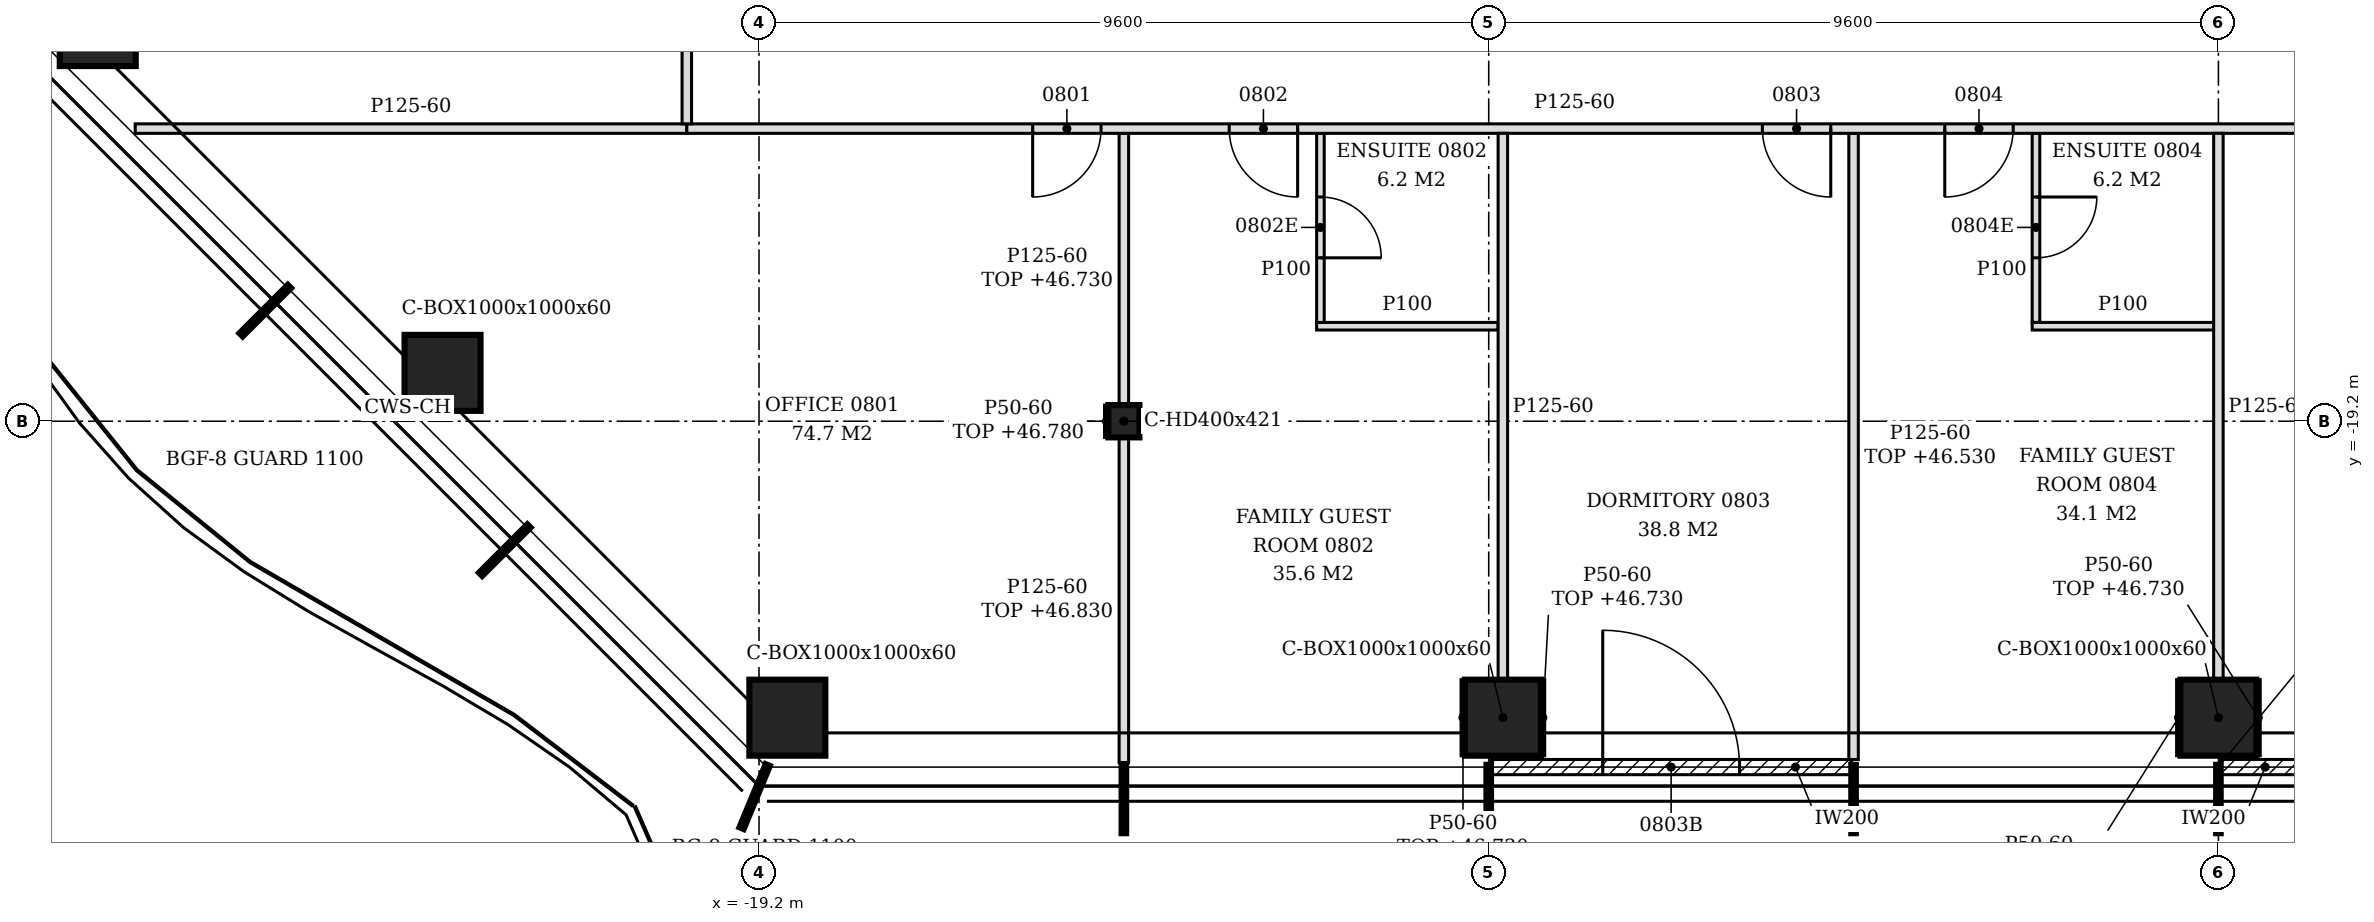
"""IFC4 building model, lengths in metres.
Left out: names, types, materials, properties, quantities, classifications, styles, units other than length and angle.
Written with IfcOpenShell. Run it as: python <this file> out.ifc"""

import sys

from ifc_helpers import new_model, si_unit, direction, frame, frame_2d, origin, origin_2d, place, context, subcontext, project, spatial, polyline, rectangle, hollow_rectangle, i_section, outline, extrude, element, fill, save


model = new_model("IFC4")
c1 = context("Model", 3, precision=1e-05, world=origin(), true_north=direction((0.0, 1.0)))
c2 = subcontext(c1, "Body", "Model", "MODEL_VIEW")
j1 = project(units=[si_unit("LENGTHUNIT", "METRE"), si_unit("PLANEANGLEUNIT", "RADIAN")], contexts=[c1])
p1 = place(None, origin())
s1 = spatial("IfcSite", under=j1, at=p1, CompositionType="ELEMENT")
p2 = place(p1, origin())
s2 = spatial("IfcBuilding", under=s1, at=p2, CompositionType="ELEMENT")
p3 = place(p2, frame((0.0, 0.0, 43.8)))
s3 = spatial("IfcBuildingStorey", under=s2, at=p3, CompositionType="ELEMENT", Elevation=43.8)
for number, where, z_axis, x_axis in (
    (1, (-18.827, -23.1, -0.15), (0.0, 0.0, 1.0), (1.0, 0.0, 0.0)),
    (2, (-9.414, -23.1, -0.15), (0.0, 0.0, 1.0), (1.0, 0.0, 0.0)),
    (3, (0.0, -23.1, -0.15), (0.0, 0.0, 1.0), (1.0, 0.0, 0.0)),
    (4, (-27.9, -14.027, -0.15), (0.0, 0.0, 1.0), (1.0, 0.0, 0.0)),
    (5, (-23.364, -18.564, -0.15), (0.0, 0.0, 1.0), (1.0, 0.0, 0.0)),
):
    element("IfcColumn", number, at=place(p3, frame(where, z_axis=z_axis, x_axis=x_axis)), inside=s3, PredefinedType="COLUMN", context=c2, shape_type="SweptSolid", body=[
        extrude(hollow_rectangle(XDim=1.0, YDim=1.0, WallThickness=0.06, at=origin_2d()), origin(), (0.0, 0.0, 1.0), 3.6),
    ])
p4 = place(p3, frame((-14.4, -19.2, -0.15), z_axis=(0.0, 0.0, 1.0), x_axis=(1.0, 0.0, 0.0)))
e6 = element("IfcColumn", 6, at=p4, inside=s3, PredefinedType="COLUMN", context=c2, shape_type="SweptSolid", body=[
    extrude(i_section(OverallWidth=0.409, OverallDepth=0.425, WebThickness=0.033, FlangeThickness=0.052, FilletRadius=0.015, at=origin_2d()), origin(), (0.0, 0.0, 1.0), 3.6),
])
p5 = place(p3, frame((-9.57, -23.75, 0.0), z_axis=(0.0, 0.0, 1.0), x_axis=(1.0, 0.0, 0.0)))
e7 = element("IfcWall", 7, at=p5, inside=s3, PredefinedType="NOTDEFINED", context=c2, shape_type="SweptSolid", body=[
    extrude(rectangle(XDim=4.74, YDim=0.2, at=frame_2d((2.37, 0.0))), origin(), (0.0, 0.0, 1.0), 3.45),
])
p6 = place(p5, frame((1.47, 0.0, 0.0)))
e8 = element("IfcOpeningElement", 8, at=p6, cuts=e7, PredefinedType="OPENING", context=c2, shape_type="SweptSolid", body=[
    extrude(rectangle(XDim=1.8, YDim=2.4, at=frame_2d((0.9, 1.2))), frame((0.0, 0.11, 0.0), z_axis=(0.0, -1.0, 0.0), x_axis=(1.0, 0.0, 0.0)), (0.0, 0.0, 1.0), 0.22),
])
p7 = place(p3, frame((0.03, -23.75, 0.0), z_axis=(0.0, 0.0, 1.0), x_axis=(1.0, 0.0, 0.0)))
e9 = element("IfcWall", 9, at=p7, inside=s3, PredefinedType="NOTDEFINED", context=c2, shape_type="SweptSolid", body=[
    extrude(rectangle(XDim=4.74, YDim=0.2, at=frame_2d((2.37, 0.0))), origin(), (0.0, 0.0, 1.0), 3.45),
])
p8 = place(p7, frame((1.17, 0.0, 0.0)))
e10 = element("IfcOpeningElement", 10, at=p8, cuts=e9, PredefinedType="OPENING", context=c2, shape_type="SweptSolid", body=[
    extrude(rectangle(XDim=2.4, YDim=2.4, at=frame_2d((1.2, 1.2))), frame((0.0, 0.11, 0.0), z_axis=(0.0, -1.0, 0.0), x_axis=(1.0, 0.0, 0.0)), (0.0, 0.0, 1.0), 0.22),
])
p9 = place(p3, frame((-14.4, -23.69, 0.0), z_axis=(0.0, 0.0, 1.0), x_axis=(0.0, 1.0, 0.0)))
e11 = element("IfcWall", 11, at=p9, inside=s3, PredefinedType="PARTITIONING", context=c2, shape_type="SweptSolid", body=[
    extrude(outline(polyline([(0.0, 0.0), (4.277, 0.0), (4.278, 3.03), (0.74, 3.03), (0.738, 2.93), (0.44, 2.93), (0.438, 3.03), (0.0, 3.03), (0.0, 0.0)])), frame((0.0, 0.062, 0.0), z_axis=(0.0, -1.0, 0.0), x_axis=(1.0, 0.0, 0.0)), (0.0, 0.0, 1.0), 0.125),
])
p10 = place(p3, frame((-4.8, -23.65, 0.0), z_axis=(0.0, 0.0, 1.0), x_axis=(0.0, 1.0, 0.0)))
e12 = element("IfcWall", 12, at=p10, inside=s3, PredefinedType="PARTITIONING", context=c2, shape_type="SweptSolid", body=[
    extrude(rectangle(XDim=8.237, YDim=0.125, at=frame_2d((4.119, 0.0))), origin(), (0.0, 0.0, 1.0), 2.73),
])
p11 = place(p3, frame((-9.414, -22.6, 0.0), z_axis=(0.0, 0.0, 1.0), x_axis=(0.0, 1.0, 0.0)))
e13 = element("IfcWall", 13, at=p11, inside=s3, PredefinedType="PARTITIONING", context=c2, shape_type="SweptSolid", body=[
    extrude(outline(polyline([(0.0, 0.0), (7.188, 0.0), (7.188, 3.45), (3.5, 3.45), (3.498, 2.93), (3.3, 2.93), (3.298, 3.45), (0.0, 3.45), (0.0, 0.0)])), frame((0.0, 0.062, 0.0), z_axis=(0.0, -1.0, 0.0), x_axis=(1.0, 0.0, 0.0)), (0.0, 0.0, 1.0), 0.125),
])
p12 = place(p3, frame((0.0, -22.6, 0.0), z_axis=(0.0, 0.0, 1.0), x_axis=(0.0, 1.0, 0.0)))
e14 = element("IfcWall", 14, at=p12, inside=s3, PredefinedType="PARTITIONING", context=c2, shape_type="SweptSolid", body=[
    extrude(outline(polyline([(0.0, 0.0), (7.188, 0.0), (7.188, 3.45), (3.505, 3.45), (3.503, 2.88), (3.295, 2.88), (3.293, 3.45), (0.0, 3.45), (0.0, 0.0)])), frame((0.0, 0.062, 0.0), z_axis=(0.0, -1.0, 0.0), x_axis=(1.0, 0.0, 0.0)), (0.0, 0.0, 1.0), 0.125),
])
p13 = place(p3, frame((-14.4, -18.988, 0.0), z_axis=(0.0, 0.0, 1.0), x_axis=(0.0, 1.0, 0.0)))
e15 = element("IfcWall", 15, at=p13, inside=s3, PredefinedType="PARTITIONING", context=c2, shape_type="SweptSolid", body=[
    extrude(rectangle(XDim=3.575, YDim=0.125, at=frame_2d((1.788, 0.0))), origin(), (0.0, 0.0, 1.0), 2.93),
])
p14 = place(p3, frame((-11.864, -17.95, 0.0), z_axis=(0.0, 0.0, 1.0), x_axis=(1.0, 0.0, 0.0)))
e16 = element("IfcWall", 16, at=p14, inside=s3, PredefinedType="PARTITIONING", context=c2, shape_type="SweptSolid", body=[
    extrude(rectangle(XDim=2.387, YDim=0.1, at=frame_2d((1.194, 0.0))), origin(), (0.0, 0.0, 1.0), 3.45),
])
p15 = place(p3, frame((-11.814, -17.9, 0.0), z_axis=(0.0, 0.0, 1.0), x_axis=(0.0, 1.0, 0.0)))
e17 = element("IfcWall", 17, at=p15, inside=s3, PredefinedType="PARTITIONING", context=c2, shape_type="SweptSolid", body=[
    extrude(rectangle(XDim=2.487, YDim=0.1, at=frame_2d((1.244, 0.0))), origin(), (0.0, 0.0, 1.0), 3.45),
])
p16 = place(p15, frame((0.85, 0.0, 0.0)))
e18 = element("IfcOpeningElement", 18, at=p16, cuts=e17, PredefinedType="OPENING", context=c2, shape_type="SweptSolid", body=[
    extrude(rectangle(XDim=0.8, YDim=2.1, at=frame_2d((0.4, 1.05))), frame((0.0, 0.06, 0.0), z_axis=(0.0, -1.0, 0.0), x_axis=(1.0, 0.0, 0.0)), (0.0, 0.0, 1.0), 0.12),
])
p17 = place(p3, frame((-2.45, -17.95, 0.0), z_axis=(0.0, 0.0, 1.0), x_axis=(1.0, 0.0, 0.0)))
e19 = element("IfcWall", 19, at=p17, inside=s3, PredefinedType="PARTITIONING", context=c2, shape_type="SweptSolid", body=[
    extrude(rectangle(XDim=2.387, YDim=0.1, at=frame_2d((1.194, 0.0))), origin(), (0.0, 0.0, 1.0), 3.45),
])
p18 = place(p3, frame((-2.4, -17.9, 0.0), z_axis=(0.0, 0.0, 1.0), x_axis=(0.0, 1.0, 0.0)))
e20 = element("IfcWall", 20, at=p18, inside=s3, PredefinedType="PARTITIONING", context=c2, shape_type="SweptSolid", body=[
    extrude(rectangle(XDim=2.487, YDim=0.1, at=frame_2d((1.244, 0.0))), origin(), (0.0, 0.0, 1.0), 3.45),
])
p19 = place(p18, frame((0.85, 0.0, 0.0)))
e21 = element("IfcOpeningElement", 21, at=p19, cuts=e20, PredefinedType="OPENING", context=c2, shape_type="SweptSolid", body=[
    extrude(rectangle(XDim=0.8, YDim=2.1, at=frame_2d((0.4, 1.05))), frame((0.0, 0.06, 0.0), z_axis=(0.0, -1.0, 0.0), x_axis=(1.0, 0.0, 0.0)), (0.0, 0.0, 1.0), 0.12),
])
p20 = place(p3, frame((-27.407, -15.35, 0.0), z_axis=(0.0, 0.0, 1.0), x_axis=(1.0, 0.0, 0.0)))
e22 = element("IfcWall", 22, at=p20, inside=s3, PredefinedType="PARTITIONING", context=c2, shape_type="SweptSolid", body=[
    extrude(outline(polyline([(0.0, 0.0), (7.257, 0.0), (7.257, 3.45), (1.104, 3.45), (1.102, 2.93), (0.555, 2.93), (0.553, 3.45), (0.0, 3.45), (0.0, 0.0)])), frame((0.0, 0.062, 0.0), z_axis=(0.0, -1.0, 0.0), x_axis=(1.0, 0.0, 0.0)), (0.0, 0.0, 1.0), 0.125),
])
p21 = place(p3, frame((-20.15, -15.35, 0.0), z_axis=(0.0, 0.0, 1.0), x_axis=(1.0, 0.0, 0.0)))
e23 = element("IfcWall", 23, at=p21, inside=s3, PredefinedType="PARTITIONING", context=c2, shape_type="SweptSolid", body=[
    extrude(outline(polyline([(0.0, 0.0), (39.287, 0.0), (39.288, 2.73), (39.2, 2.73), (39.198, 3.45), (27.5, 3.45), (27.498, 2.73), (27.2, 2.73), (27.198, 3.45), (15.5, 3.45), (15.498, 2.73), (15.2, 2.73), (15.198, 3.45), (5.9, 3.45), (5.898, 2.93), (5.6, 2.93), (5.598, 3.45), (0.0, 3.45), (0.0, 0.0)])), frame((0.0, 0.062, 0.0), z_axis=(0.0, -1.0, 0.0), x_axis=(1.0, 0.0, 0.0)), (0.0, 0.0, 1.0), 0.125),
])
p22 = place(p21, frame((4.55, 0.0, 0.0)))
e24 = element("IfcOpeningElement", 24, at=p22, cuts=e23, PredefinedType="OPENING", context=c2, shape_type="SweptSolid", body=[
    extrude(rectangle(XDim=0.9, YDim=2.1, at=frame_2d((0.45, 1.05))), frame((0.0, 0.073, 0.0), z_axis=(0.0, -1.0, 0.0), x_axis=(1.0, 0.0, 0.0)), (0.0, 0.0, 1.0), 0.145),
])
p23 = place(p21, frame((7.136, 0.0, 0.0)))
e25 = element("IfcOpeningElement", 25, at=p23, cuts=e23, PredefinedType="OPENING", context=c2, shape_type="SweptSolid", body=[
    extrude(rectangle(XDim=0.9, YDim=2.1, at=frame_2d((0.45, 1.05))), frame((0.0, 0.073, 0.0), z_axis=(0.0, -1.0, 0.0), x_axis=(1.0, 0.0, 0.0)), (0.0, 0.0, 1.0), 0.145),
])
p24 = place(p21, frame((14.15, 0.0, 0.0)))
e26 = element("IfcOpeningElement", 26, at=p24, cuts=e23, PredefinedType="OPENING", context=c2, shape_type="SweptSolid", body=[
    extrude(rectangle(XDim=0.9, YDim=2.1, at=frame_2d((0.45, 1.05))), frame((0.0, 0.073, 0.0), z_axis=(0.0, -1.0, 0.0), x_axis=(1.0, 0.0, 0.0)), (0.0, 0.0, 1.0), 0.145),
])
p25 = place(p21, frame((16.55, 0.0, 0.0)))
e27 = element("IfcOpeningElement", 27, at=p25, cuts=e23, PredefinedType="OPENING", context=c2, shape_type="SweptSolid", body=[
    extrude(rectangle(XDim=0.9, YDim=2.1, at=frame_2d((0.45, 1.05))), frame((0.0, 0.073, 0.0), z_axis=(0.0, -1.0, 0.0), x_axis=(1.0, 0.0, 0.0)), (0.0, 0.0, 1.0), 0.145),
])
p26 = place(p21, frame((21.35, 0.0, 0.0)))
e28 = element("IfcOpeningElement", 28, at=p26, cuts=e23, PredefinedType="OPENING", context=c2, shape_type="SweptSolid", body=[
    extrude(rectangle(XDim=0.9, YDim=2.1, at=frame_2d((0.45, 1.05))), frame((0.0, 0.073, 0.0), z_axis=(0.0, -1.0, 0.0), x_axis=(1.0, 0.0, 0.0)), (0.0, 0.0, 1.0), 0.145),
])
p27 = place(p21, frame((28.364, 0.0, 0.0)))
e29 = element("IfcOpeningElement", 29, at=p27, cuts=e23, PredefinedType="OPENING", context=c2, shape_type="SweptSolid", body=[
    extrude(rectangle(XDim=0.9, YDim=2.1, at=frame_2d((0.45, 1.05))), frame((0.0, 0.073, 0.0), z_axis=(0.0, -1.0, 0.0), x_axis=(1.0, 0.0, 0.0)), (0.0, 0.0, 1.0), 0.145),
])
p28 = place(p21, frame((32.35, 0.0, 0.0)))
e30 = element("IfcOpeningElement", 30, at=p28, cuts=e23, PredefinedType="OPENING", context=c2, shape_type="SweptSolid", body=[
    extrude(rectangle(XDim=0.9, YDim=2.1, at=frame_2d((0.45, 1.05))), frame((0.0, 0.073, 0.0), z_axis=(0.0, -1.0, 0.0), x_axis=(1.0, 0.0, 0.0)), (0.0, 0.0, 1.0), 0.145),
])
p29 = place(p21, frame((37.35, 0.0, 0.0)))
e31 = element("IfcOpeningElement", 31, at=p29, cuts=e23, PredefinedType="OPENING", context=c2, shape_type="SweptSolid", body=[
    extrude(rectangle(XDim=0.9, YDim=2.1, at=frame_2d((0.45, 1.05))), frame((0.0, 0.073, 0.0), z_axis=(0.0, -1.0, 0.0), x_axis=(1.0, 0.0, 0.0)), (0.0, 0.0, 1.0), 0.145),
])
p30 = place(p3, frame((-20.15, -15.288, 0.0), z_axis=(0.0, 0.0, 1.0), x_axis=(0.0, 1.0, 0.0)))
e32 = element("IfcWall", 32, at=p30, inside=s3, PredefinedType="PARTITIONING", context=c2, shape_type="SweptSolid", body=[
    extrude(outline(polyline([(0.0, 0.0), (37.876, 0.0), (37.876, 3.45), (37.622, 3.45), (37.62, 2.63), (36.507, 2.63), (36.505, 3.45), (34.583, 3.45), (34.581, 2.98), (34.393, 2.98), (34.39, 3.45), (29.798, 3.45), (29.795, 2.83), (29.577, 2.83), (29.575, 3.45), (24.998, 3.45), (24.996, 2.83), (24.778, 2.83), (24.775, 3.45), (20.198, 3.45), (20.196, 2.83), (19.978, 2.83), (19.976, 3.45), (15.397, 3.45), (15.396, 2.83), (15.177, 2.83), (15.176, 3.45), (10.597, 3.45), (10.595, 2.83), (10.377, 2.83), (10.375, 3.45), (5.798, 3.45), (5.795, 2.83), (5.577, 2.83), (5.575, 3.45), (0.998, 3.45), (0.996, 2.83), (0.778, 2.83), (0.775, 3.45), (0.0, 3.45), (0.0, 0.0)])), frame((0.0, 0.062, 0.0), z_axis=(0.0, -1.0, 0.0), x_axis=(1.0, 0.0, 0.0)), (0.0, 0.0, 1.0), 0.125),
])
p31 = place(p30, frame((9.337, 0.0, 0.0)))
e33 = element("IfcOpeningElement", 33, at=p31, cuts=e32, PredefinedType="OPENING", context=c2, shape_type="SweptSolid", body=[
    extrude(rectangle(XDim=0.9, YDim=2.1, at=frame_2d((0.45, 1.05))), frame((0.0, 0.073, 0.0), z_axis=(0.0, -1.0, 0.0), x_axis=(1.0, 0.0, 0.0)), (0.0, 0.0, 1.0), 0.145),
])
p32 = place(p30, frame((10.912, 0.0, 0.0)))
e34 = element("IfcOpeningElement", 34, at=p32, cuts=e32, PredefinedType="OPENING", context=c2, shape_type="SweptSolid", body=[
    extrude(rectangle(XDim=0.9, YDim=2.1, at=frame_2d((0.45, 1.05))), frame((0.0, 0.073, 0.0), z_axis=(0.0, -1.0, 0.0), x_axis=(1.0, 0.0, 0.0)), (0.0, 0.0, 1.0), 0.145),
])
p33 = place(p30, frame((16.488, 0.0, 0.0)))
e35 = element("IfcOpeningElement", 35, at=p33, cuts=e32, PredefinedType="OPENING", context=c2, shape_type="SweptSolid", body=[
    extrude(rectangle(XDim=0.9, YDim=2.1, at=frame_2d((0.45, 1.05))), frame((0.0, 0.073, 0.0), z_axis=(0.0, -1.0, 0.0), x_axis=(1.0, 0.0, 0.0)), (0.0, 0.0, 1.0), 0.145),
])
p34 = place(p30, frame((23.664, 0.0, 0.0)))
e36 = element("IfcOpeningElement", 36, at=p34, cuts=e32, PredefinedType="OPENING", context=c2, shape_type="SweptSolid", body=[
    extrude(rectangle(XDim=0.9, YDim=2.1, at=frame_2d((0.45, 1.05))), frame((0.0, 0.073, 0.0), z_axis=(0.0, -1.0, 0.0), x_axis=(1.0, 0.0, 0.0)), (0.0, 0.0, 1.0), 0.145),
])
p35 = place(p30, frame((26.387, 0.0, 0.0)))
e37 = element("IfcOpeningElement", 37, at=p35, cuts=e32, PredefinedType="OPENING", context=c2, shape_type="SweptSolid", body=[
    extrude(rectangle(XDim=0.9, YDim=2.1, at=frame_2d((0.45, 1.05))), frame((0.0, 0.073, 0.0), z_axis=(0.0, -1.0, 0.0), x_axis=(1.0, 0.0, 0.0)), (0.0, 0.0, 1.0), 0.145),
])
p36 = place(p30, frame((29.615, 0.0, 0.0)))
e38 = element("IfcOpeningElement", 38, at=p36, cuts=e32, PredefinedType="OPENING", context=c2, shape_type="SweptSolid", body=[
    extrude(rectangle(XDim=0.9, YDim=2.1, at=frame_2d((0.45, 1.05))), frame((0.0, 0.073, 0.0), z_axis=(0.0, -1.0, 0.0), x_axis=(1.0, 0.0, 0.0)), (0.0, 0.0, 1.0), 0.145),
])
p37 = place(p3, frame((-14.629, -19.413, 0.0), z_axis=(0.0, 0.0, 1.0), x_axis=(0.0, 1.0, 0.0)))
e39 = element("IfcWall", 39, at=p37, inside=s3, PredefinedType="PARTITIONING", context=c2, shape_type="SweptSolid", body=[
    extrude(rectangle(XDim=0.425, YDim=0.05, at=frame_2d((0.212, 0.0))), origin(), (0.0, 0.0, 1.0), 2.98),
])
for number, where, z_axis, x_axis in (
    (40, (-0.525, -23.6, 0.0), (0.0, 0.0, 1.0), (0.0, 1.0, 0.0)),
    (41, (0.525, -23.6, 0.0), (0.0, 0.0, 1.0), (0.0, 1.0, 0.0)),
    (42, (-9.939, -23.6, 0.0), (0.0, 0.0, 1.0), (0.0, 1.0, 0.0)),
    (43, (-8.889, -23.6, 0.0), (0.0, 0.0, 1.0), (0.0, 1.0, 0.0)),
):
    element("IfcWall", number, at=place(p3, frame(where, z_axis=z_axis, x_axis=x_axis)), inside=s3, PredefinedType="PARTITIONING", context=c2, shape_type="SweptSolid", body=[
        extrude(rectangle(XDim=1.0, YDim=0.05, at=frame_2d((0.5, 0.0))), origin(), (0.0, 0.0, 1.0), 2.93),
    ])
p38 = place(p6, origin())
e44 = element("IfcDoor", 44, at=p38, inside=s3, OperationType="SINGLE_SWING_LEFT", PredefinedType="DOOR", context=c2, shape_type="SweptSolid", body=[
    extrude(rectangle(XDim=1.8, YDim=2.4, at=frame_2d((0.9, 1.2))), frame((0.0, 0.025, 0.0), z_axis=(0.0, -1.0, 0.0), x_axis=(1.0, 0.0, 0.0)), (0.0, 0.0, 1.0), 0.05),
])
fill(e8, e44)
p39 = place(p22, frame((0.9, 0.0, 0.0), z_axis=(0.0, 0.0, 1.0), x_axis=(-1.0, 0.0, 0.0)))
e45 = element("IfcDoor", 45, at=p39, inside=s3, OperationType="SINGLE_SWING_RIGHT", PredefinedType="DOOR", context=c2, shape_type="SweptSolid", body=[
    extrude(rectangle(XDim=0.9, YDim=2.1, at=frame_2d((0.45, 1.05))), frame((0.0, 0.025, 0.0), z_axis=(0.0, -1.0, 0.0), x_axis=(1.0, 0.0, 0.0)), (0.0, 0.0, 1.0), 0.05),
])
fill(e24, e45)
p40 = place(p23, frame((0.9, 0.0, 0.0), z_axis=(0.0, 0.0, 1.0), x_axis=(-1.0, 0.0, 0.0)))
e46 = element("IfcDoor", 46, at=p40, inside=s3, OperationType="SINGLE_SWING_LEFT", PredefinedType="DOOR", context=c2, shape_type="SweptSolid", body=[
    extrude(rectangle(XDim=0.9, YDim=2.1, at=frame_2d((0.45, 1.05))), frame((0.0, 0.025, 0.0), z_axis=(0.0, -1.0, 0.0), x_axis=(1.0, 0.0, 0.0)), (0.0, 0.0, 1.0), 0.05),
])
fill(e25, e46)
p41 = place(p16, frame((0.8, 0.0, 0.0), z_axis=(0.0, 0.0, 1.0), x_axis=(-1.0, 0.0, 0.0)))
e47 = element("IfcDoor", 47, at=p41, inside=s3, OperationType="SINGLE_SWING_RIGHT", PredefinedType="DOOR", context=c2, shape_type="SweptSolid", body=[
    extrude(rectangle(XDim=0.8, YDim=2.1, at=frame_2d((0.4, 1.05))), frame((0.0, 0.025, 0.0), z_axis=(0.0, -1.0, 0.0), x_axis=(1.0, 0.0, 0.0)), (0.0, 0.0, 1.0), 0.05),
])
fill(e18, e47)
p42 = place(p24, frame((0.9, 0.0, 0.0), z_axis=(0.0, 0.0, 1.0), x_axis=(-1.0, 0.0, 0.0)))
e48 = element("IfcDoor", 48, at=p42, inside=s3, OperationType="SINGLE_SWING_LEFT", PredefinedType="DOOR", context=c2, shape_type="SweptSolid", body=[
    extrude(rectangle(XDim=0.9, YDim=2.1, at=frame_2d((0.45, 1.05))), frame((0.0, 0.025, 0.0), z_axis=(0.0, -1.0, 0.0), x_axis=(1.0, 0.0, 0.0)), (0.0, 0.0, 1.0), 0.05),
])
fill(e26, e48)
p43 = place(p25, frame((0.9, 0.0, 0.0), z_axis=(0.0, 0.0, 1.0), x_axis=(-1.0, 0.0, 0.0)))
e49 = element("IfcDoor", 49, at=p43, inside=s3, OperationType="SINGLE_SWING_RIGHT", PredefinedType="DOOR", context=c2, shape_type="SweptSolid", body=[
    extrude(rectangle(XDim=0.9, YDim=2.1, at=frame_2d((0.45, 1.05))), frame((0.0, 0.025, 0.0), z_axis=(0.0, -1.0, 0.0), x_axis=(1.0, 0.0, 0.0)), (0.0, 0.0, 1.0), 0.05),
])
fill(e27, e49)
p44 = place(p19, frame((0.8, 0.0, 0.0), z_axis=(0.0, 0.0, 1.0), x_axis=(-1.0, 0.0, 0.0)))
e50 = element("IfcDoor", 50, at=p44, inside=s3, OperationType="SINGLE_SWING_LEFT", PredefinedType="DOOR", context=c2, shape_type="SweptSolid", body=[
    extrude(rectangle(XDim=0.8, YDim=2.1, at=frame_2d((0.4, 1.05))), frame((0.0, 0.025, 0.0), z_axis=(0.0, -1.0, 0.0), x_axis=(1.0, 0.0, 0.0)), (0.0, 0.0, 1.0), 0.05),
])
fill(e21, e50)
save(model, sys.argv[1])
